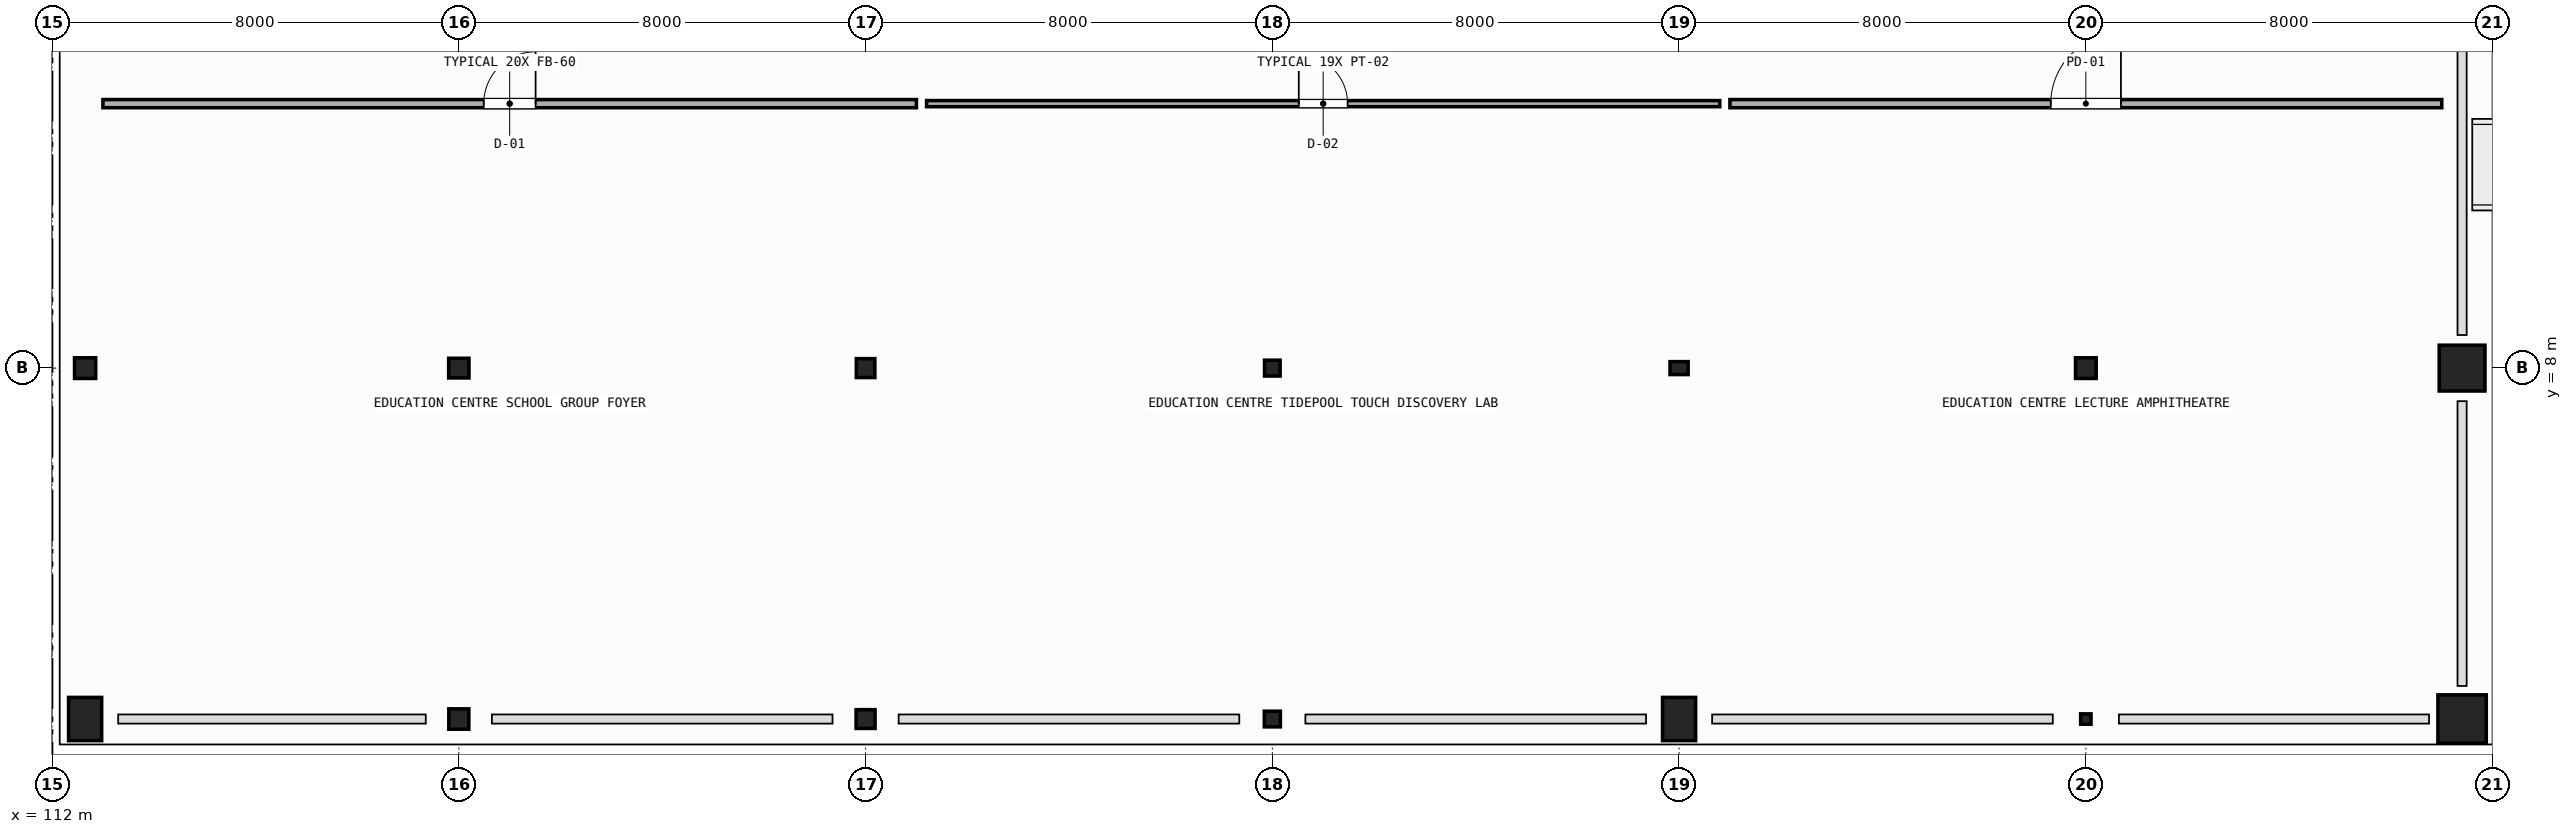
"""IFC4 building model, lengths in metres.
Left out: names, types, materials, properties, quantities, classifications, styles, units other than length and angle.
Written with IfcOpenShell. Run it as: python <this file> out.ifc"""

import sys

from ifc_helpers import new_model, si_unit, direction, frame, frame_2d, origin, origin_2d, place, context, subcontext, project, spatial, rectangle, hollow_rectangle, hollow_circle, i_section, extrude, element, fill, save


model = new_model("IFC4")
c1 = context("Model", 3, precision=1e-05, world=origin(), true_north=direction((0.0, 1.0)))
c2 = subcontext(c1, "Body", "Model", "MODEL_VIEW")
j1 = project(units=[si_unit("LENGTHUNIT", "METRE"), si_unit("PLANEANGLEUNIT", "RADIAN")], contexts=[c1])
p1 = place(None, origin())
s1 = spatial("IfcSite", under=j1, at=p1, CompositionType="ELEMENT")
p2 = place(p1, origin())
s2 = spatial("IfcBuilding", under=s1, at=p2, CompositionType="ELEMENT")
p3 = place(p2, origin())
s3 = spatial("IfcBuildingStorey", under=s2, at=p3, CompositionType="ELEMENT", Elevation=0.0)
p4 = place(p3, frame((112.65, 1.1, 0.0), z_axis=(0.0, 0.0, 1.0), x_axis=(1.0, 0.0, 0.0)))
e1 = element("IfcColumn", 1, at=p4, inside=s3, PredefinedType="PILASTER", context=c2, shape_type="SweptSolid", body=[
    extrude(rectangle(XDim=0.65, YDim=0.85, at=origin_2d()), origin(), (0.0, 0.0, 1.0), 5.12),
])
p5 = place(p3, frame((112.65, 8.0, 0.0), z_axis=(0.0, 0.0, 1.0), x_axis=(0.0, 1.0, 0.0)))
e2 = element("IfcColumn", 2, at=p5, inside=s3, PredefinedType="COLUMN", context=c2, shape_type="SweptSolid", body=[
    extrude(i_section(OverallWidth=0.406, OverallDepth=0.416, WebThickness=0.03, FlangeThickness=0.048, FilletRadius=0.015, at=origin_2d()), origin(), (0.0, 0.0, 1.0), 5.12),
])
p6 = place(p3, frame((120.0, 1.1, 0.0), z_axis=(0.0, 0.0, 1.0), x_axis=(0.0, 1.0, 0.0)))
e3 = element("IfcColumn", 3, at=p6, inside=s3, PredefinedType="COLUMN", context=c2, shape_type="SweptSolid", body=[
    extrude(i_section(OverallWidth=0.4, OverallDepth=0.393, WebThickness=0.023, FlangeThickness=0.037, FilletRadius=0.015, at=origin_2d()), origin(), (0.0, 0.0, 1.0), 5.12),
])
p7 = place(p3, frame((120.0, 8.0, 0.0), z_axis=(0.0, 0.0, 1.0), x_axis=(1.0, 0.0, 0.0)))
e4 = element("IfcColumn", 4, at=p7, inside=s3, PredefinedType="COLUMN", context=c2, shape_type="SweptSolid", body=[
    extrude(i_section(OverallWidth=0.399, OverallDepth=0.386, WebThickness=0.021, FlangeThickness=0.033, FilletRadius=0.015, at=origin_2d()), origin(), (0.0, 0.0, 1.0), 5.12),
])
p8 = place(p3, frame((128.0, 1.1, 0.0), z_axis=(0.0, 0.0, 1.0), x_axis=(1.0, 0.0, 0.0)))
e5 = element("IfcColumn", 5, at=p8, inside=s3, PredefinedType="COLUMN", context=c2, shape_type="SweptSolid", body=[
    extrude(i_section(OverallWidth=0.373, OverallDepth=0.368, WebThickness=0.015, FlangeThickness=0.024, FilletRadius=0.015, at=origin_2d()), origin(), (0.0, 0.0, 1.0), 5.12),
])
p9 = place(p3, frame((128.0, 8.0, 0.0), z_axis=(0.0, 0.0, 1.0), x_axis=(0.0, 1.0, 0.0)))
e6 = element("IfcColumn", 6, at=p9, inside=s3, PredefinedType="COLUMN", context=c2, shape_type="SweptSolid", body=[
    extrude(i_section(OverallWidth=0.371, OverallDepth=0.364, WebThickness=0.013, FlangeThickness=0.022, FilletRadius=0.015, at=origin_2d()), origin(), (0.0, 0.0, 1.0), 5.12),
])
p10 = place(p3, frame((136.0, 1.1, 0.0), z_axis=(0.0, 0.0, 1.0), x_axis=(0.0, 1.0, 0.0)))
e7 = element("IfcColumn", 7, at=p10, inside=s3, PredefinedType="COLUMN", context=c2, shape_type="SweptSolid", body=[
    extrude(i_section(OverallWidth=0.307, OverallDepth=0.315, WebThickness=0.012, FlangeThickness=0.019, FilletRadius=0.013, at=origin_2d()), origin(), (0.0, 0.0, 1.0), 5.12),
])
p11 = place(p3, frame((136.0, 8.0, 0.0), z_axis=(0.0, 0.0, 1.0), x_axis=(1.0, 0.0, 0.0)))
e8 = element("IfcColumn", 8, at=p11, inside=s3, PredefinedType="COLUMN", context=c2, shape_type="SweptSolid", body=[
    extrude(i_section(OverallWidth=0.306, OverallDepth=0.311, WebThickness=0.011, FlangeThickness=0.017, FilletRadius=0.013, at=origin_2d()), origin(), (0.0, 0.0, 1.0), 5.12),
])
p12 = place(p3, frame((144.0, 1.1, 0.0), z_axis=(0.0, 0.0, 1.0), x_axis=(1.0, 0.0, 0.0)))
e9 = element("IfcColumn", 9, at=p12, inside=s3, PredefinedType="PILASTER", context=c2, shape_type="SweptSolid", body=[
    extrude(rectangle(XDim=0.65, YDim=0.85, at=origin_2d()), origin(), (0.0, 0.0, 1.0), 5.12),
])
p13 = place(p3, frame((144.0, 8.0, 0.0), z_axis=(0.0, 0.0, 1.0), x_axis=(0.0, 1.0, 0.0)))
e10 = element("IfcColumn", 10, at=p13, inside=s3, PredefinedType="COLUMN", context=c2, shape_type="SweptSolid", body=[
    extrude(hollow_rectangle(XDim=0.254, YDim=0.356, WallThickness=0.012, InnerFilletRadius=0.012, OuterFilletRadius=0.024, at=origin_2d()), origin(), (0.0, 0.0, 1.0), 5.12),
])
p14 = place(p3, frame((152.0, 1.1, 0.0), z_axis=(0.0, 0.0, 1.0), x_axis=(0.0, 1.0, 0.0)))
e11 = element("IfcColumn", 11, at=p14, inside=s3, PredefinedType="COLUMN", context=c2, shape_type="SweptSolid", body=[
    extrude(hollow_rectangle(XDim=0.203, YDim=0.203, WallThickness=0.009, InnerFilletRadius=0.009, OuterFilletRadius=0.018, at=origin_2d()), origin(), (0.0, 0.0, 1.0), 5.12),
])
p15 = place(p3, frame((152.0, 8.0, 0.0), z_axis=(0.0, 0.0, 1.0), x_axis=(1.0, 0.0, 0.0)))
e12 = element("IfcColumn", 12, at=p15, inside=s3, PredefinedType="COLUMN", context=c2, shape_type="SweptSolid", body=[
    extrude(hollow_circle(Radius=0.203, WallThickness=0.012, at=origin_2d()), origin(), (0.0, 0.0, 1.0), 5.4),
])
p16 = place(p3, frame((159.4, 1.1, 0.0), z_axis=(0.0, 0.0, 1.0), x_axis=(1.0, 0.0, 0.0)))
e13 = element("IfcColumn", 13, at=p16, inside=s3, PredefinedType="COLUMN", context=c2, shape_type="SweptSolid", body=[
    extrude(rectangle(XDim=0.95, YDim=0.95, at=origin_2d()), origin(), (0.0, 0.0, 1.0), 5.12),
])
p17 = place(p3, frame((159.4, 8.0, 0.0), z_axis=(0.0, 0.0, 1.0), x_axis=(0.0, 1.0, 0.0)))
e14 = element("IfcColumn", 14, at=p17, inside=s3, PredefinedType="COLUMN", context=c2, shape_type="SweptSolid", body=[
    extrude(rectangle(XDim=0.9, YDim=0.9, at=origin_2d()), origin(), (0.0, 0.0, 1.0), 5.12),
])
p18 = place(p3, frame((113.0, 13.2, 0.0), z_axis=(0.0, 0.0, 1.0), x_axis=(1.0, 0.0, 0.0)))
e15 = element("IfcWall", 15, at=p18, inside=s3, PredefinedType="PARTITIONING", context=c2, shape_type="SweptSolid", body=[
    extrude(rectangle(XDim=16.0, YDim=0.16, at=frame_2d((8.0, 0.0))), origin(), (0.0, 0.0, 1.0), 4.29),
])
p19 = place(p18, frame((7.49, 0.0, 0.0)))
e16 = element("IfcOpeningElement", 16, at=p19, cuts=e15, PredefinedType="OPENING", context=c2, shape_type="SweptSolid", body=[
    extrude(rectangle(XDim=1.02, YDim=2.15, at=frame_2d((0.51, 1.075))), frame((0.0, 0.09, 0.0), z_axis=(0.0, -1.0, 0.0), x_axis=(1.0, 0.0, 0.0)), (0.0, 0.0, 1.0), 0.18),
])
p20 = place(p3, frame((129.2, 13.2, 0.0), z_axis=(0.0, 0.0, 1.0), x_axis=(1.0, 0.0, 0.0)))
e17 = element("IfcWall", 17, at=p20, inside=s3, PredefinedType="PARTITIONING", context=c2, shape_type="SweptSolid", body=[
    extrude(rectangle(XDim=15.6, YDim=0.12, at=frame_2d((7.8, 0.0))), origin(), (0.0, 0.0, 1.0), 4.29),
])
p21 = place(p20, frame((7.32, 0.0, 0.0)))
e18 = element("IfcOpeningElement", 18, at=p21, cuts=e17, PredefinedType="OPENING", context=c2, shape_type="SweptSolid", body=[
    extrude(rectangle(XDim=0.96, YDim=2.1, at=frame_2d((0.48, 1.05))), frame((0.0, 0.07, 0.0), z_axis=(0.0, -1.0, 0.0), x_axis=(1.0, 0.0, 0.0)), (0.0, 0.0, 1.0), 0.14),
])
p22 = place(p3, frame((145.0, 13.2, 0.0), z_axis=(0.0, 0.0, 1.0), x_axis=(1.0, 0.0, 0.0)))
e19 = element("IfcWall", 19, at=p22, inside=s3, PredefinedType="PARTITIONING", context=c2, shape_type="SweptSolid", body=[
    extrude(rectangle(XDim=14.0, YDim=0.16, at=frame_2d((7.0, 0.0))), origin(), (0.0, 0.0, 1.0), 4.29),
])
p23 = place(p22, frame((6.31, 0.0, 0.0)))
e20 = element("IfcOpeningElement", 20, at=p23, cuts=e19, PredefinedType="OPENING", context=c2, shape_type="SweptSolid", body=[
    extrude(rectangle(XDim=1.38, YDim=2.25, at=frame_2d((0.69, 1.125))), frame((0.0, 0.09, 0.0), z_axis=(0.0, -1.0, 0.0), x_axis=(1.0, 0.0, 0.0)), (0.0, 0.0, 1.0), 0.18),
])
p24 = place(p19, origin())
e21 = element("IfcDoor", 21, at=p24, inside=s3, OperationType="SINGLE_SWING_RIGHT", PredefinedType="DOOR", context=c2, shape_type="SweptSolid", body=[
    extrude(rectangle(XDim=1.02, YDim=2.15, at=frame_2d((0.51, 1.075))), frame((0.0, 0.025, 0.0), z_axis=(0.0, -1.0, 0.0), x_axis=(1.0, 0.0, 0.0)), (0.0, 0.0, 1.0), 0.05),
])
fill(e16, e21)
p25 = place(p21, origin())
e22 = element("IfcDoor", 22, at=p25, inside=s3, OperationType="SINGLE_SWING_LEFT", PredefinedType="DOOR", context=c2, shape_type="SweptSolid", body=[
    extrude(rectangle(XDim=0.96, YDim=2.1, at=frame_2d((0.48, 1.05))), frame((0.0, 0.025, 0.0), z_axis=(0.0, -1.0, 0.0), x_axis=(1.0, 0.0, 0.0)), (0.0, 0.0, 1.0), 0.05),
])
fill(e18, e22)
p26 = place(p23, origin())
e23 = element("IfcDoor", 23, at=p26, inside=s3, OperationType="SINGLE_SWING_RIGHT", PredefinedType="DOOR", context=c2, shape_type="SweptSolid", body=[
    extrude(rectangle(XDim=1.38, YDim=2.25, at=frame_2d((0.69, 1.125))), frame((0.0, 0.025, 0.0), z_axis=(0.0, -1.0, 0.0), x_axis=(1.0, 0.0, 0.0)), (0.0, 0.0, 1.0), 0.05),
])
fill(e20, e23)
save(model, sys.argv[1])
